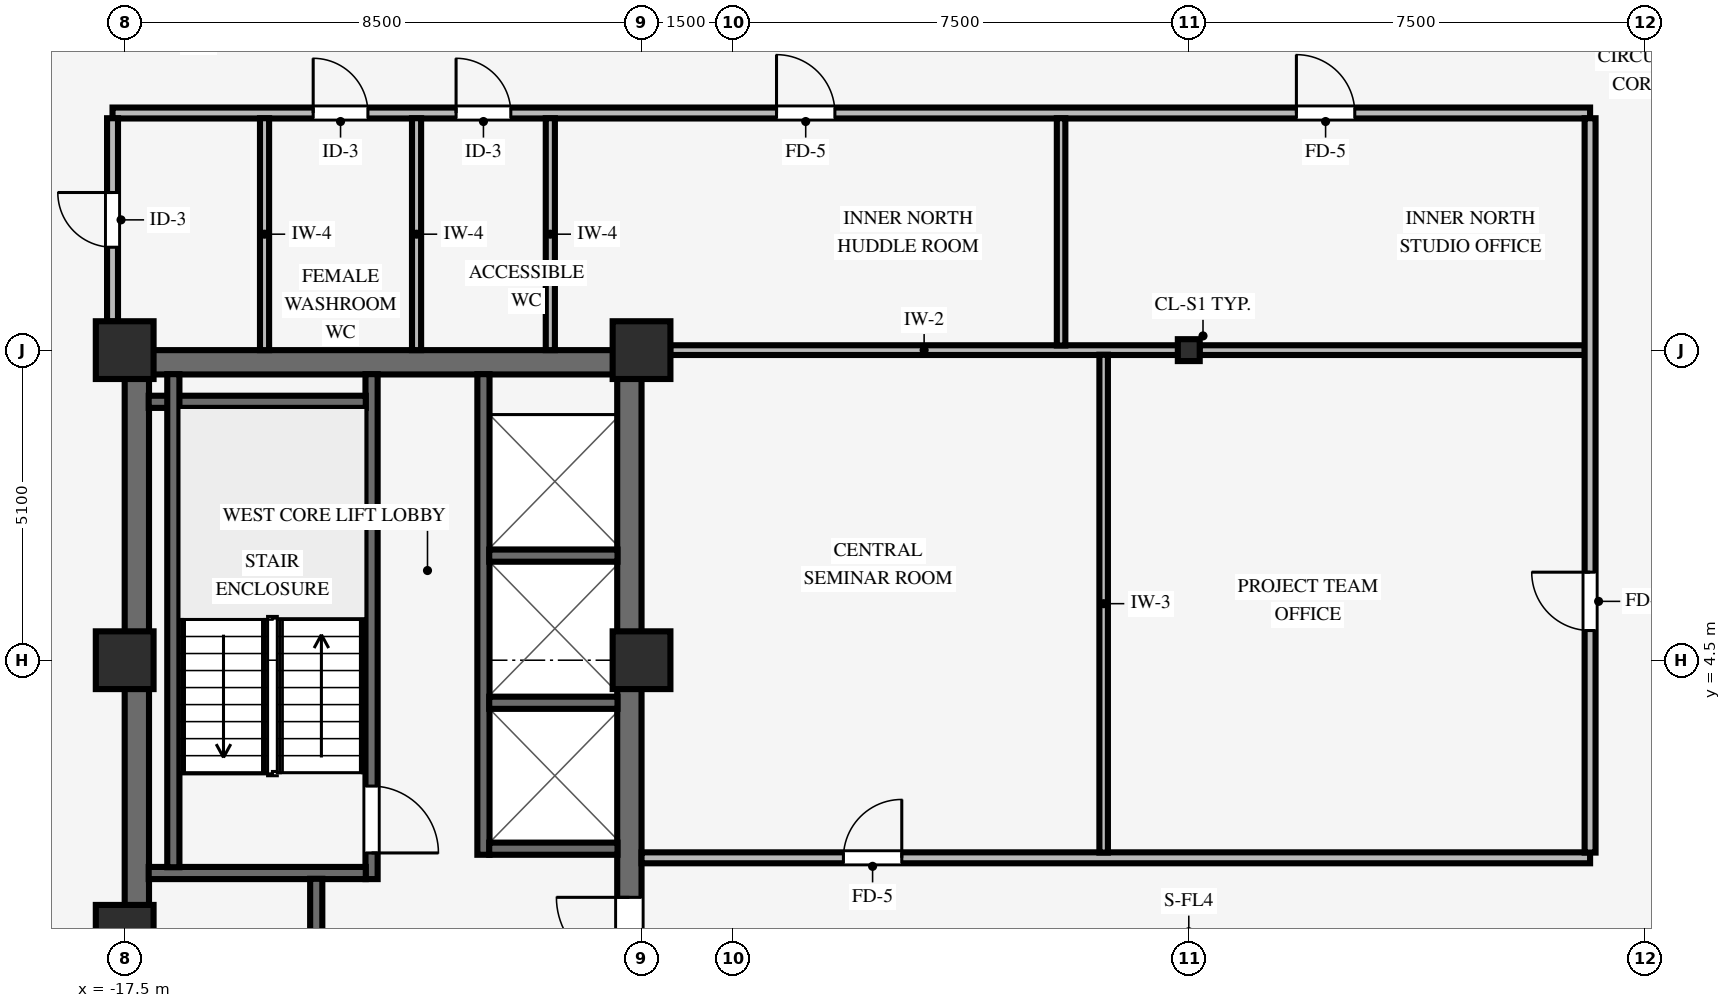
"""IFC4 building model, lengths in metres.
Left out: names, types, materials, properties, quantities, classifications, styles, units other than length and angle.
Written with IfcOpenShell. Run it as: python <this file> out.ifc"""

import sys

from ifc_helpers import new_model, si_unit, direction, frame, frame_2d, origin, origin_2d, place, context, subcontext, project, spatial, rectangle, i_section, extrude, source, transform, mapped, element, fill, save


model = new_model("IFC4")
c1 = context("Model", 3, precision=1e-05, world=origin(), true_north=direction((0.0, 1.0)))
c2 = subcontext(c1, "Body", "Model", "MODEL_VIEW")
j1 = project(units=[si_unit("LENGTHUNIT", "METRE"), si_unit("PLANEANGLEUNIT", "RADIAN")], contexts=[c1])
p1 = place(None, origin())
s1 = spatial("IfcSite", under=j1, at=p1, CompositionType="ELEMENT")
p2 = place(p1, origin())
s2 = spatial("IfcBuilding", under=s1, at=p2, CompositionType="ELEMENT")
p3 = place(p2, frame((0.0, 0.0, 164.0)))
s3 = spatial("IfcBuildingStorey", under=s2, at=p3, CompositionType="ELEMENT", Elevation=164.0)
p4 = place(p3, frame((-17.5, 9.4, 0.0), z_axis=(0.0, 0.0, 1.0), x_axis=(1.0, 0.0, 0.0)))
e1 = element("IfcWall", 1, at=p4, inside=s3, PredefinedType="SHEAR", context=c2, shape_type="SweptSolid", body=[
    extrude(rectangle(XDim=8.5, YDim=0.4, at=frame_2d((4.25, 0.0))), origin(), (0.0, 0.0, 1.0), 3.25),
])
p5 = place(p3, frame((-17.3, -9.205, 0.0), z_axis=(0.0, 0.0, 1.0), x_axis=(0.0, 1.0, 0.0)))
e2 = element("IfcWall", 2, at=p5, inside=s3, PredefinedType="SHEAR", context=c2, shape_type="SweptSolid", body=[
    extrude(rectangle(XDim=18.41, YDim=0.4, at=frame_2d((9.205, 0.0))), origin(), (0.0, 0.0, 1.0), 3.25),
])
p6 = place(p3, frame((-9.2, -9.205, 0.0), z_axis=(0.0, 0.0, 1.0), x_axis=(0.0, 1.0, 0.0)))
e3 = element("IfcWall", 3, at=p6, inside=s3, PredefinedType="SHEAR", context=c2, shape_type="SweptSolid", body=[
    extrude(rectangle(XDim=18.41, YDim=0.4, at=frame_2d((9.205, 0.0))), origin(), (0.0, 0.0, 1.0), 3.25),
])
p7 = place(p6, frame((8.605, 0.0, 0.0)))
e4 = element("IfcOpeningElement", 4, at=p7, cuts=e3, PredefinedType="OPENING", context=c2, shape_type="SweptSolid", body=[
    extrude(rectangle(XDim=1.2, YDim=2.15, at=frame_2d((0.6, 1.075))), frame((0.0, 0.21, 0.0), z_axis=(0.0, -1.0, 0.0), x_axis=(1.0, 0.0, 0.0)), (0.0, 0.0, 1.0), 0.42),
])
for number, where, z_axis, x_axis in (
    (5, (-17.5, 4.5, 0.0), (0.0, 0.0, 1.0), (1.0, 0.0, 0.0)),
    (6, (-17.5, 9.6, 0.0), (0.0, 0.0, 1.0), (1.0, 0.0, 0.0)),
    (7, (-9.0, 4.5, 0.0), (0.0, 0.0, 1.0), (1.0, 0.0, 0.0)),
    (8, (-9.0, 9.6, 0.0), (0.0, 0.0, 1.0), (1.0, 0.0, 0.0)),
    (9, (-17.5, 0.0, 0.0), (0.0, 0.0, 1.0), (1.0, 0.0, 0.0)),
):
    element("IfcColumn", number, at=place(p3, frame(where, z_axis=z_axis, x_axis=x_axis)), inside=s3, PredefinedType="COLUMN", context=c2, shape_type="SweptSolid", body=[
        extrude(rectangle(XDim=0.95, YDim=0.95, at=origin_2d()), origin(), (0.0, 0.0, 1.0), 3.25),
    ])
p8 = place(p3, frame((0.0, 9.6, 0.0), z_axis=(0.0, 0.0, 1.0), x_axis=(1.0, 0.0, 0.0)))
e10 = element("IfcColumn", 10, at=p8, inside=s3, PredefinedType="COLUMN", context=c2, shape_type="SweptSolid", body=[
    extrude(i_section(OverallWidth=0.36, OverallDepth=0.36, WebThickness=0.021, FlangeThickness=0.021, FilletRadius=0.018, at=origin_2d()), origin(), (0.0, 0.0, 1.0), 3.25),
])
p9 = place(p3, frame((-13.44, 0.9, 0.0), z_axis=(0.0, 0.0, 1.0), x_axis=(0.0, 1.0, 0.0)))
e11 = element("IfcWall", 11, at=p9, inside=s3, PredefinedType="SHEAR", context=c2, shape_type="SweptSolid", body=[
    extrude(rectangle(XDim=8.305, YDim=0.2, at=frame_2d((4.153, 0.0))), origin(), (0.0, 0.0, 1.0), 3.25),
])
p10 = place(p9, frame((1.53, 0.0, 0.0), z_axis=(0.0, 0.0, 1.0), x_axis=(-1.0, 0.0, 0.0)))
e12 = element("IfcOpeningElement", 12, at=p10, cuts=e11, PredefinedType="OPENING", context=c2, shape_type="SweptSolid", body=[
    extrude(rectangle(XDim=1.1, YDim=2.15, at=frame_2d((0.55, 1.075))), frame((0.0, 0.11, 0.0), z_axis=(0.0, -1.0, 0.0), x_axis=(1.0, 0.0, 0.0)), (0.0, 0.0, 1.0), 0.22),
])
for number, where, z_axis, x_axis in (
    (13, (-17.105, 1.0, 0.0), (0.0, 0.0, 1.0), (1.0, 0.0, 0.0)),
    (14, (-17.105, 8.75, 0.0), (0.0, 0.0, 1.0), (1.0, 0.0, 0.0)),
):
    element("IfcWall", number, at=place(p3, frame(where, z_axis=z_axis, x_axis=x_axis)), inside=s3, PredefinedType="SHEAR", context=c2, shape_type="SweptSolid", body=[
        extrude(rectangle(XDim=3.57, YDim=0.2, at=frame_2d((1.785, 0.0))), origin(), (0.0, 0.0, 1.0), 3.25),
    ])
p11 = place(p3, frame((-16.7, 1.095, 0.0), z_axis=(0.0, 0.0, 1.0), x_axis=(0.0, 1.0, 0.0)))
e15 = element("IfcWall", 15, at=p11, inside=s3, PredefinedType="SHEAR", context=c2, shape_type="SweptSolid", body=[
    extrude(rectangle(XDim=8.11, YDim=0.2, at=frame_2d((4.055, 0.0))), origin(), (0.0, 0.0, 1.0), 3.25),
])
p12 = place(p3, frame((-14.35, -6.2, 0.0), z_axis=(0.0, 0.0, 1.0), x_axis=(0.0, 1.0, 0.0)))
e16 = element("IfcWall", 16, at=p12, inside=s3, PredefinedType="SHEAR", context=c2, shape_type="SweptSolid", body=[
    extrude(rectangle(XDim=7.105, YDim=0.2, at=frame_2d((3.552, 0.0))), origin(), (0.0, 0.0, 1.0), 3.25),
])
p13 = place(p12, frame((5.69, 0.0, 0.0), z_axis=(0.0, 0.0, 1.0), x_axis=(-1.0, 0.0, 0.0)))
e17 = element("IfcOpeningElement", 17, at=p13, cuts=e16, PredefinedType="OPENING", context=c2, shape_type="SweptSolid", body=[
    extrude(rectangle(XDim=0.88, YDim=2.1, at=frame_2d((0.44, 1.05))), frame((0.0, 0.11, 0.0), z_axis=(0.0, -1.0, 0.0), x_axis=(1.0, 0.0, 0.0)), (0.0, 0.0, 1.0), 0.22),
])
p14 = place(p12, frame((1.15, 0.0, 0.0)))
e18 = element("IfcOpeningElement", 18, at=p14, cuts=e16, PredefinedType="OPENING", context=c2, shape_type="SweptSolid", body=[
    extrude(rectangle(XDim=1.3, YDim=2.2, at=frame_2d((0.65, 1.1))), frame((0.0, 0.11, 0.0), z_axis=(0.0, -1.0, 0.0), x_axis=(1.0, 0.0, 0.0)), (0.0, 0.0, 1.0), 0.22),
])
p15 = place(p3, frame((-11.6, 1.3, 0.0), z_axis=(0.0, 0.0, 1.0), x_axis=(0.0, 1.0, 0.0)))
e19 = element("IfcWall", 19, at=p15, inside=s3, PredefinedType="SHEAR", context=c2, shape_type="SweptSolid", body=[
    extrude(rectangle(XDim=7.905, YDim=0.2, at=frame_2d((3.953, 0.0))), origin(), (0.0, 0.0, 1.0), 3.25),
])
for number, where, z_axis, x_axis in (
    (20, (-11.505, 1.4, 0.0), (0.0, 0.0, 1.0), (1.0, 0.0, 0.0)),
    (21, (-11.505, 3.8, 0.0), (0.0, 0.0, 1.0), (1.0, 0.0, 0.0)),
    (22, (-11.505, 6.22, 0.0), (0.0, 0.0, 1.0), (1.0, 0.0, 0.0)),
):
    element("IfcWall", number, at=place(p3, frame(where, z_axis=z_axis, x_axis=x_axis)), inside=s3, PredefinedType="SHEAR", context=c2, shape_type="SweptSolid", body=[
        extrude(rectangle(XDim=2.11, YDim=0.2, at=frame_2d((1.055, 0.0))), origin(), (0.0, 0.0, 1.0), 3.25),
    ])
p16 = place(p3, frame((-9.0, 1.25, 0.0), z_axis=(0.0, 0.0, 1.0), x_axis=(1.0, 0.0, 0.0)))
e23 = element("IfcWall", 23, at=p16, inside=s3, PredefinedType="PARTITIONING", context=c2, shape_type="SweptSolid", body=[
    extrude(rectangle(XDim=15.6, YDim=0.18, at=frame_2d((7.8, 0.0))), origin(), (0.0, 0.0, 1.0), 3.24),
])
p17 = place(p16, frame((3.32, 0.0, 0.0)))
e24 = element("IfcOpeningElement", 24, at=p17, cuts=e23, PredefinedType="OPENING", context=c2, shape_type="SweptSolid", body=[
    extrude(rectangle(XDim=0.96, YDim=2.1, at=frame_2d((0.48, 1.05))), frame((0.0, 0.1, 0.0), z_axis=(0.0, -1.0, 0.0), x_axis=(1.0, 0.0, 0.0)), (0.0, 0.0, 1.0), 0.2),
])
p18 = place(p3, frame((-8.529, 9.6, 0.0), z_axis=(0.0, 0.0, 1.0), x_axis=(1.0, 0.0, 0.0)))
e25 = element("IfcWall", 25, at=p18, inside=s3, PredefinedType="PARTITIONING", context=c2, shape_type="SweptSolid", body=[
    extrude(rectangle(XDim=8.353, YDim=0.16, at=frame_2d((4.177, 0.0))), origin(), (0.0, 0.0, 1.0), 2.285),
])
p19 = place(p3, frame((0.176, 9.6, 0.0), z_axis=(0.0, 0.0, 1.0), x_axis=(1.0, 0.0, 0.0)))
e26 = element("IfcWall", 26, at=p19, inside=s3, PredefinedType="PARTITIONING", context=c2, shape_type="SweptSolid", body=[
    extrude(rectangle(XDim=6.338, YDim=0.16, at=frame_2d((3.169, 0.0))), origin(), (0.0, 0.0, 1.0), 2.285),
])
p20 = place(p3, frame((-17.7, 13.5, 0.0), z_axis=(0.0, 0.0, 1.0), x_axis=(1.0, 0.0, 0.0)))
e27 = element("IfcWall", 27, at=p20, inside=s3, PredefinedType="PARTITIONING", context=c2, shape_type="SweptSolid", body=[
    extrude(rectangle(XDim=24.3, YDim=0.18, at=frame_2d((12.15, 0.0))), origin(), (0.0, 0.0, 1.0), 2.888),
])
p21 = place(p20, frame((19.47, 0.0, 0.0)))
e28 = element("IfcOpeningElement", 28, at=p21, cuts=e27, PredefinedType="OPENING", context=c2, shape_type="SweptSolid", body=[
    extrude(rectangle(XDim=0.96, YDim=2.1, at=frame_2d((0.48, 1.05))), frame((0.0, 0.1, 0.0), z_axis=(0.0, -1.0, 0.0), x_axis=(1.0, 0.0, 0.0)), (0.0, 0.0, 1.0), 0.2),
])
p22 = place(p20, frame((10.92, 0.0, 0.0)))
e29 = element("IfcOpeningElement", 29, at=p22, cuts=e27, PredefinedType="OPENING", context=c2, shape_type="SweptSolid", body=[
    extrude(rectangle(XDim=0.96, YDim=2.1, at=frame_2d((0.48, 1.05))), frame((0.0, 0.1, 0.0), z_axis=(0.0, -1.0, 0.0), x_axis=(1.0, 0.0, 0.0)), (0.0, 0.0, 1.0), 0.2),
])
p23 = place(p20, frame((3.3, 0.0, 0.0)))
e30 = element("IfcOpeningElement", 30, at=p23, cuts=e27, PredefinedType="OPENING", context=c2, shape_type="SweptSolid", body=[
    extrude(rectangle(XDim=0.9, YDim=2.1, at=frame_2d((0.45, 1.05))), frame((0.0, 0.1, 0.0), z_axis=(0.0, -1.0, 0.0), x_axis=(1.0, 0.0, 0.0)), (0.0, 0.0, 1.0), 0.2),
])
p24 = place(p20, frame((5.65, 0.0, 0.0)))
e31 = element("IfcOpeningElement", 31, at=p24, cuts=e27, PredefinedType="OPENING", context=c2, shape_type="SweptSolid", body=[
    extrude(rectangle(XDim=0.9, YDim=2.1, at=frame_2d((0.45, 1.05))), frame((0.0, 0.1, 0.0), z_axis=(0.0, -1.0, 0.0), x_axis=(1.0, 0.0, 0.0)), (0.0, 0.0, 1.0), 0.2),
])
p25 = place(p3, frame((-17.7, 10.071, 0.0), z_axis=(0.0, 0.0, 1.0), x_axis=(0.0, 1.0, 0.0)))
e32 = element("IfcWall", 32, at=p25, inside=s3, PredefinedType="PARTITIONING", context=c2, shape_type="SweptSolid", body=[
    extrude(rectangle(XDim=3.343, YDim=0.18, at=frame_2d((1.671, 0.0))), origin(), (0.0, 0.0, 1.0), 2.696),
])
p26 = place(p25, frame((1.221, 0.0, 0.0)))
e33 = element("IfcOpeningElement", 33, at=p26, cuts=e32, PredefinedType="OPENING", context=c2, shape_type="SweptSolid", body=[
    extrude(rectangle(XDim=0.9, YDim=2.1, at=frame_2d((0.45, 1.05))), frame((0.0, 0.1, 0.0), z_axis=(0.0, -1.0, 0.0), x_axis=(1.0, 0.0, 0.0)), (0.0, 0.0, 1.0), 0.2),
])
for number, where, z_axis, x_axis in (
    (34, (-15.2, 9.6, 0.0), (0.0, 0.0, 1.0), (0.0, 1.0, 0.0)),
    (35, (-12.7, 9.6, 0.0), (0.0, 0.0, 1.0), (0.0, 1.0, 0.0)),
    (36, (-10.5, 9.6, 0.0), (0.0, 0.0, 1.0), (0.0, 1.0, 0.0)),
):
    element("IfcWall", number, at=place(p3, frame(where, z_axis=z_axis, x_axis=x_axis)), inside=s3, PredefinedType="PARTITIONING", context=c2, shape_type="SweptSolid", body=[
        extrude(rectangle(XDim=3.814, YDim=0.15, at=frame_2d((1.907, 0.0))), origin(), (0.0, 0.0, 1.0), 3.24),
    ])
p27 = place(p3, frame((-2.1, 9.676, 0.0), z_axis=(0.0, 0.0, 1.0), x_axis=(0.0, 1.0, 0.0)))
e37 = element("IfcWall", 37, at=p27, inside=s3, PredefinedType="PARTITIONING", context=c2, shape_type="SweptSolid", body=[
    extrude(rectangle(XDim=3.738, YDim=0.14, at=frame_2d((1.869, 0.0))), origin(), (0.0, 0.0, 1.0), 3.24),
])
p28 = place(p3, frame((-1.4, 1.336, 0.0), z_axis=(0.0, 0.0, 1.0), x_axis=(0.0, 1.0, 0.0)))
e38 = element("IfcWall", 38, at=p28, inside=s3, PredefinedType="PARTITIONING", context=c2, shape_type="SweptSolid", body=[
    extrude(rectangle(XDim=8.188, YDim=0.14, at=frame_2d((4.094, 0.0))), origin(), (0.0, 0.0, 1.0), 3.24),
])
p29 = place(p3, frame((6.6, 1.336, 0.0), z_axis=(0.0, 0.0, 1.0), x_axis=(0.0, 1.0, 0.0)))
e39 = element("IfcWall", 39, at=p29, inside=s3, PredefinedType="PARTITIONING", context=c2, shape_type="SweptSolid", body=[
    extrude(rectangle(XDim=12.078, YDim=0.18, at=frame_2d((6.039, 0.0))), origin(), (0.0, 0.0, 1.0), 3.24),
])
p30 = place(p29, frame((3.652, 0.0, 0.0)))
e40 = element("IfcOpeningElement", 40, at=p30, cuts=e39, PredefinedType="OPENING", context=c2, shape_type="SweptSolid", body=[
    extrude(rectangle(XDim=0.96, YDim=2.1, at=frame_2d((0.48, 1.05))), frame((0.0, 0.1, 0.0), z_axis=(0.0, -1.0, 0.0), x_axis=(1.0, 0.0, 0.0)), (0.0, 0.0, 1.0), 0.2),
])
m1 = source(origin(), c2, "Body", "SweptSolid", [
    extrude(rectangle(XDim=1.1, YDim=2.15, at=frame_2d((0.55, 1.075))), frame((0.0, 0.025, 0.0), z_axis=(0.0, -1.0, 0.0), x_axis=(1.0, 0.0, 0.0)), (0.0, 0.0, 1.0), 0.05),
])
p31 = place(p10, origin())
e41 = element("IfcDoor", 41, at=p31, inside=s3, OperationType="SINGLE_SWING_RIGHT", PredefinedType="DOOR", context=c2, shape_type="MappedRepresentation", body=[
    mapped(m1, transform((0.0, 0.0, 0.0), scale=1.0)),
])
fill(e12, e41)
m2 = source(origin(), c2, "Body", "SweptSolid", [
    extrude(rectangle(XDim=1.2, YDim=2.15, at=frame_2d((0.6, 1.075))), frame((0.0, 0.025, 0.0), z_axis=(0.0, -1.0, 0.0), x_axis=(1.0, 0.0, 0.0)), (0.0, 0.0, 1.0), 0.05),
])
p32 = place(p7, origin())
e42 = element("IfcDoor", 42, at=p32, inside=s3, OperationType="SINGLE_SWING_RIGHT", PredefinedType="DOOR", context=c2, shape_type="MappedRepresentation", body=[
    mapped(m2, transform((0.0, 0.0, 0.0), scale=1.0)),
])
fill(e4, e42)
m3 = source(origin(), c2, "Body", "SweptSolid", [
    extrude(rectangle(XDim=0.96, YDim=2.1, at=frame_2d((0.48, 1.05))), frame((0.0, 0.025, 0.0), z_axis=(0.0, -1.0, 0.0), x_axis=(1.0, 0.0, 0.0)), (0.0, 0.0, 1.0), 0.05),
])
p33 = place(p21, origin())
e43 = element("IfcDoor", 43, at=p33, inside=s3, OperationType="SINGLE_SWING_LEFT", PredefinedType="DOOR", context=c2, shape_type="MappedRepresentation", body=[
    mapped(m3, transform((0.0, 0.0, 0.0), scale=1.0)),
])
fill(e28, e43)
p34 = place(p22, origin())
e44 = element("IfcDoor", 44, at=p34, inside=s3, OperationType="SINGLE_SWING_LEFT", PredefinedType="DOOR", context=c2, shape_type="MappedRepresentation", body=[
    mapped(m3, transform((0.0, 0.0, 0.0), scale=1.0)),
])
fill(e29, e44)
p35 = place(p30, origin())
e45 = element("IfcDoor", 45, at=p35, inside=s3, OperationType="SINGLE_SWING_RIGHT", PredefinedType="DOOR", context=c2, shape_type="MappedRepresentation", body=[
    mapped(m3, transform((0.0, 0.0, 0.0), scale=1.0)),
])
fill(e40, e45)
p36 = place(p17, origin())
e46 = element("IfcDoor", 46, at=p36, inside=s3, OperationType="SINGLE_SWING_RIGHT", PredefinedType="DOOR", context=c2, shape_type="MappedRepresentation", body=[
    mapped(m3, transform((0.0, 0.0, 0.0), scale=1.0)),
])
fill(e24, e46)
m4 = source(origin(), c2, "Body", "SweptSolid", [
    extrude(rectangle(XDim=0.9, YDim=2.1, at=frame_2d((0.45, 1.05))), frame((0.0, 0.025, 0.0), z_axis=(0.0, -1.0, 0.0), x_axis=(1.0, 0.0, 0.0)), (0.0, 0.0, 1.0), 0.05),
])
p37 = place(p26, origin())
e47 = element("IfcDoor", 47, at=p37, inside=s3, OperationType="SINGLE_SWING_RIGHT", PredefinedType="DOOR", context=c2, shape_type="MappedRepresentation", body=[
    mapped(m4, transform((0.0, 0.0, 0.0), scale=1.0)),
])
fill(e33, e47)
p38 = place(p23, origin())
e48 = element("IfcDoor", 48, at=p38, inside=s3, OperationType="SINGLE_SWING_LEFT", PredefinedType="DOOR", context=c2, shape_type="MappedRepresentation", body=[
    mapped(m4, transform((0.0, 0.0, 0.0), scale=1.0)),
])
fill(e30, e48)
p39 = place(p24, origin())
e49 = element("IfcDoor", 49, at=p39, inside=s3, OperationType="SINGLE_SWING_LEFT", PredefinedType="DOOR", context=c2, shape_type="MappedRepresentation", body=[
    mapped(m4, transform((0.0, 0.0, 0.0), scale=1.0)),
])
fill(e31, e49)
save(model, sys.argv[1])
